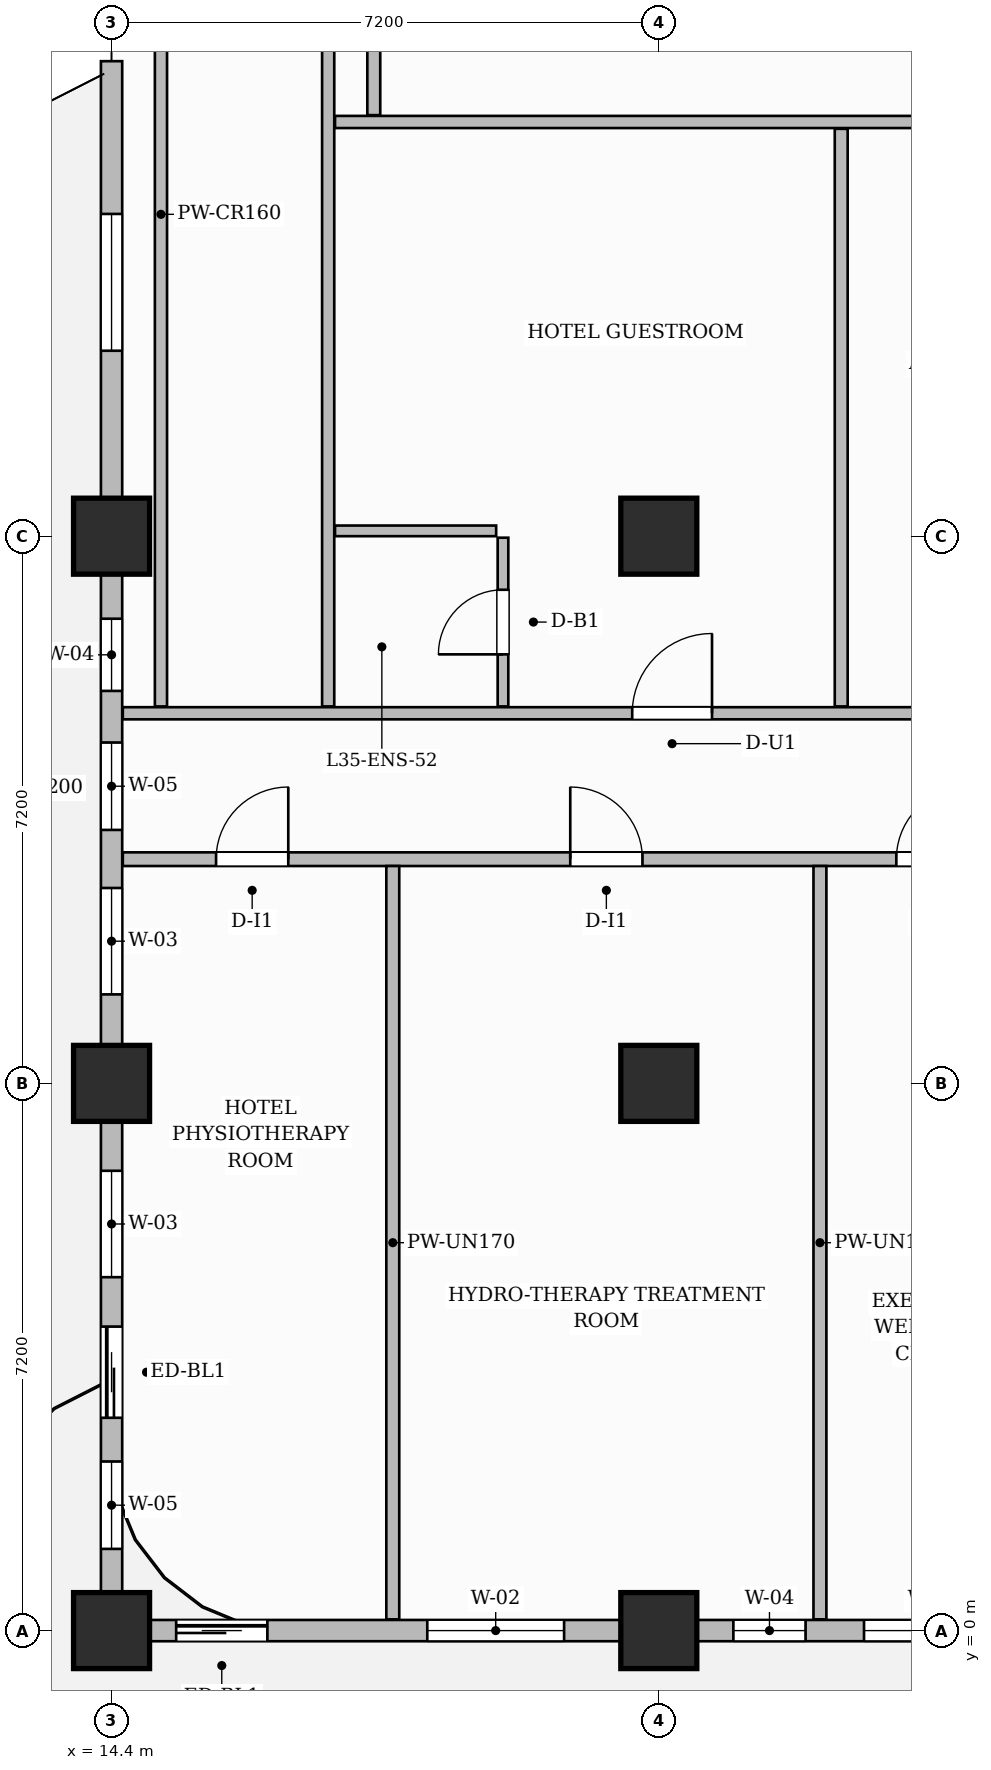
"""IFC4 building model, lengths in metres.
Left out: names, types, materials, properties, quantities, classifications, styles, units other than length and angle.
Written with IfcOpenShell. Run it as: python <this file> out.ifc"""

import sys

from ifc_helpers import new_model, si_unit, direction, frame, frame_2d, origin, origin_2d, place, context, subcontext, project, spatial, rectangle, extrude, source, transform, mapped, element, fill, save


model = new_model("IFC4")
c1 = context("Model", 3, precision=1e-05, world=origin(), true_north=direction((0.0, 1.0)))
c2 = subcontext(c1, "Body", "Model", "MODEL_VIEW")
j1 = project(units=[si_unit("LENGTHUNIT", "METRE"), si_unit("PLANEANGLEUNIT", "RADIAN")], contexts=[c1])
p1 = place(None, origin())
s1 = spatial("IfcSite", under=j1, at=p1, CompositionType="ELEMENT")
p2 = place(p1, origin())
s2 = spatial("IfcBuilding", under=s1, at=p2, CompositionType="ELEMENT")
p3 = place(p2, frame((0.0, 0.0, 141.4)))
s3 = spatial("IfcBuildingStorey", under=s2, at=p3, CompositionType="ELEMENT", Elevation=141.4)
m1 = source(origin(), c2, "Body", "SweptSolid", [
    extrude(rectangle(XDim=1.0, YDim=1.0, at=origin_2d()), origin(), (0.0, 0.0, 1.0), 3.7),
])
for number, where, z_axis, x_axis in (
    (1, (14.4, 0.0, 0.0), (0.0, 0.0, 1.0), (1.0, 0.0, 0.0)),
    (2, (14.4, 7.2, 0.0), (0.0, 0.0, 1.0), (1.0, 0.0, 0.0)),
    (3, (14.4, 14.4, 0.0), (0.0, 0.0, 1.0), (1.0, 0.0, 0.0)),
    (4, (21.6, 0.0, 0.0), (0.0, 0.0, 1.0), (1.0, 0.0, 0.0)),
    (5, (21.6, 7.2, 0.0), (0.0, 0.0, 1.0), (1.0, 0.0, 0.0)),
    (6, (21.6, 14.4, 0.0), (0.0, 0.0, 1.0), (1.0, 0.0, 0.0)),
):
    element("IfcColumn", number, at=place(p3, frame(where, z_axis=z_axis, x_axis=x_axis)), inside=s3, PredefinedType="COLUMN", context=c2, shape_type="MappedRepresentation", body=[
        mapped(m1, transform((0.0, 0.0, 0.0), scale=1.0)),
    ])
p4 = place(p3, frame((14.548, 10.15, 0.0), z_axis=(0.0, 0.0, 1.0), x_axis=(1.0, 0.0, 0.0)))
e7 = element("IfcWall", 7, at=p4, inside=s3, PredefinedType="PARTITIONING", context=c2, shape_type="SweptSolid", body=[
    extrude(rectangle(XDim=15.562, YDim=0.18, at=frame_2d((7.781, 0.0))), origin(), (0.0, 0.0, 1.0), 3.4),
])
p5 = place(p4, frame((1.227, 0.0, 0.0)))
e8 = element("IfcOpeningElement", 8, at=p5, cuts=e7, PredefinedType="OPENING", context=c2, shape_type="SweptSolid", body=[
    extrude(rectangle(XDim=0.95, YDim=2.15, at=frame_2d((0.475, 1.075))), frame((0.0, 0.1, 0.0), z_axis=(0.0, -1.0, 0.0), x_axis=(1.0, 0.0, 0.0)), (0.0, 0.0, 1.0), 0.2),
])
p6 = place(p4, frame((5.887, 0.0, 0.0)))
e9 = element("IfcOpeningElement", 9, at=p6, cuts=e7, PredefinedType="OPENING", context=c2, shape_type="SweptSolid", body=[
    extrude(rectangle(XDim=0.95, YDim=2.15, at=frame_2d((0.475, 1.075))), frame((0.0, 0.1, 0.0), z_axis=(0.0, -1.0, 0.0), x_axis=(1.0, 0.0, 0.0)), (0.0, 0.0, 1.0), 0.2),
])
p7 = place(p4, frame((10.177, 0.0, 0.0)))
e10 = element("IfcOpeningElement", 10, at=p7, cuts=e7, PredefinedType="OPENING", context=c2, shape_type="SweptSolid", body=[
    extrude(rectangle(XDim=0.95, YDim=2.15, at=frame_2d((0.475, 1.075))), frame((0.0, 0.1, 0.0), z_axis=(0.0, -1.0, 0.0), x_axis=(1.0, 0.0, 0.0)), (0.0, 0.0, 1.0), 0.2),
])
p8 = place(p4, frame((13.417, 0.0, 0.0)))
e11 = element("IfcOpeningElement", 11, at=p8, cuts=e7, PredefinedType="OPENING", context=c2, shape_type="SweptSolid", body=[
    extrude(rectangle(XDim=0.95, YDim=2.15, at=frame_2d((0.475, 1.075))), frame((0.0, 0.1, 0.0), z_axis=(0.0, -1.0, 0.0), x_axis=(1.0, 0.0, 0.0)), (0.0, 0.0, 1.0), 0.2),
])
p9 = place(p3, frame((14.548, 12.07, 0.0), z_axis=(0.0, 0.0, 1.0), x_axis=(1.0, 0.0, 0.0)))
e12 = element("IfcWall", 12, at=p9, inside=s3, PredefinedType="PARTITIONING", context=c2, shape_type="SweptSolid", body=[
    extrude(rectangle(XDim=15.562, YDim=0.16, at=frame_2d((7.781, 0.0))), origin(), (0.0, 0.0, 1.0), 3.4),
])
p10 = place(p9, frame((6.702, 0.0, 0.0)))
e13 = element("IfcOpeningElement", 13, at=p10, cuts=e12, PredefinedType="OPENING", context=c2, shape_type="SweptSolid", body=[
    extrude(rectangle(XDim=1.05, YDim=2.25, at=frame_2d((0.525, 1.125))), frame((0.0, 0.09, 0.0), z_axis=(0.0, -1.0, 0.0), x_axis=(1.0, 0.0, 0.0)), (0.0, 0.0, 1.0), 0.18),
])
p11 = place(p9, frame((11.852, 0.0, 0.0)))
e14 = element("IfcOpeningElement", 14, at=p11, cuts=e12, PredefinedType="OPENING", context=c2, shape_type="SweptSolid", body=[
    extrude(rectangle(XDim=1.4, YDim=2.35, at=frame_2d((0.7, 1.175))), frame((0.0, 0.09, 0.0), z_axis=(0.0, -1.0, 0.0), x_axis=(1.0, 0.0, 0.0)), (0.0, 0.0, 1.0), 0.18),
])
p12 = place(p3, frame((18.1, 0.148, 0.0), z_axis=(0.0, 0.0, 1.0), x_axis=(0.0, 1.0, 0.0)))
e15 = element("IfcWall", 15, at=p12, inside=s3, PredefinedType="PARTITIONING", context=c2, shape_type="SweptSolid", body=[
    extrude(rectangle(XDim=9.912, YDim=0.17, at=frame_2d((4.956, 0.0))), origin(), (0.0, 0.0, 1.0), 3.055),
])
p13 = place(p3, frame((23.72, 0.148, 0.0), z_axis=(0.0, 0.0, 1.0), x_axis=(0.0, 1.0, 0.0)))
e16 = element("IfcWall", 16, at=p13, inside=s3, PredefinedType="PARTITIONING", context=c2, shape_type="SweptSolid", body=[
    extrude(rectangle(XDim=9.912, YDim=0.17, at=frame_2d((4.956, 0.0))), origin(), (0.0, 0.0, 1.0), 3.4),
])
for number, where, z_axis, x_axis in (
    (17, (15.05, 12.16, 0.0), (0.0, 0.0, 1.0), (0.0, 1.0, 0.0)),
    (18, (17.25, 12.16, 0.0), (0.0, 0.0, 1.0), (0.0, 1.0, 0.0)),
):
    element("IfcWall", number, at=place(p3, frame(where, z_axis=z_axis, x_axis=x_axis)), inside=s3, PredefinedType="PARTITIONING", context=c2, shape_type="SweptSolid", body=[
        extrude(rectangle(XDim=12.95, YDim=0.16, at=frame_2d((6.475, 0.0))), origin(), (0.0, 0.0, 1.0), 3.4),
    ])
p14 = place(p3, frame((17.85, 19.94, 0.0), z_axis=(0.0, 0.0, 1.0), x_axis=(0.0, 1.0, 0.0)))
e19 = element("IfcWall", 19, at=p14, inside=s3, PredefinedType="PARTITIONING", context=c2, shape_type="SweptSolid", body=[
    extrude(rectangle(XDim=5.22, YDim=0.17, at=frame_2d((2.61, 0.0))), origin(), (0.0, 0.0, 1.0), 3.055),
])
p15 = place(p3, frame((17.34, 19.85, 0.0), z_axis=(0.0, 0.0, 1.0), x_axis=(1.0, 0.0, 0.0)))
e20 = element("IfcWall", 20, at=p15, inside=s3, PredefinedType="PARTITIONING", context=c2, shape_type="SweptSolid", body=[
    extrude(rectangle(XDim=10.92, YDim=0.16, at=frame_2d((5.46, 0.0))), origin(), (0.0, 0.0, 1.0), 3.4),
])
p16 = place(p3, frame((24.0, 12.16, 0.0), z_axis=(0.0, 0.0, 1.0), x_axis=(0.0, 1.0, 0.0)))
e21 = element("IfcWall", 21, at=p16, inside=s3, PredefinedType="PARTITIONING", context=c2, shape_type="SweptSolid", body=[
    extrude(rectangle(XDim=7.6, YDim=0.17, at=frame_2d((3.8, 0.0))), origin(), (0.0, 0.0, 1.0), 3.4),
])
p17 = place(p3, frame((19.55, 12.16, 0.0), z_axis=(0.0, 0.0, 1.0), x_axis=(0.0, 1.0, 0.0)))
e22 = element("IfcWall", 22, at=p17, inside=s3, PredefinedType="PARTITIONING", context=c2, shape_type="SweptSolid", body=[
    extrude(rectangle(XDim=2.22, YDim=0.14, at=frame_2d((1.11, 0.0))), origin(), (0.0, 0.0, 1.0), 3.4),
])
p18 = place(p17, frame((0.685, 0.0, 0.0)))
e23 = element("IfcOpeningElement", 23, at=p18, cuts=e22, PredefinedType="OPENING", context=c2, shape_type="SweptSolid", body=[
    extrude(rectangle(XDim=0.85, YDim=2.1, at=frame_2d((0.425, 1.05))), frame((0.0, 0.08, 0.0), z_axis=(0.0, -1.0, 0.0), x_axis=(1.0, 0.0, 0.0)), (0.0, 0.0, 1.0), 0.16),
])
p19 = place(p3, frame((17.34, 14.47, 0.0), z_axis=(0.0, 0.0, 1.0), x_axis=(1.0, 0.0, 0.0)))
e24 = element("IfcWall", 24, at=p19, inside=s3, PredefinedType="PARTITIONING", context=c2, shape_type="SweptSolid", body=[
    extrude(rectangle(XDim=2.12, YDim=0.14, at=frame_2d((1.06, 0.0))), origin(), (0.0, 0.0, 1.0), 2.885),
])
p20 = place(p3, frame((14.4, 0.0, 0.0), z_axis=(0.0, 0.0, 1.0), x_axis=(1.0, 0.0, 0.0)))
e25 = element("IfcWall", 25, at=p20, inside=s3, PredefinedType="SOLIDWALL", context=c2, shape_type="SweptSolid", body=[
    extrude(rectangle(XDim=35.4, YDim=0.28, at=frame_2d((17.7, 0.0))), origin(), (0.0, 0.0, 1.0), 2.885),
])
p21 = place(p20, frame((0.85, 0.0, 0.0)))
e26 = element("IfcOpeningElement", 26, at=p21, cuts=e25, PredefinedType="OPENING", context=c2, shape_type="SweptSolid", body=[
    extrude(rectangle(XDim=1.2, YDim=2.2, at=frame_2d((0.6, 1.1))), frame((0.0, 0.15, 0.0), z_axis=(0.0, -1.0, 0.0), x_axis=(1.0, 0.0, 0.0)), (0.0, 0.0, 1.0), 0.3),
])
p22 = place(p20, frame((4.154, 0.0, 0.8)))
e27 = element("IfcOpeningElement", 27, at=p22, cuts=e25, PredefinedType="OPENING", context=c2, shape_type="SweptSolid", body=[
    extrude(rectangle(XDim=1.8, YDim=1.85, at=frame_2d((0.9, 0.925))), frame((0.0, 0.15, 0.0), z_axis=(0.0, -1.0, 0.0), x_axis=(1.0, 0.0, 0.0)), (0.0, 0.0, 1.0), 0.3),
])
p23 = place(p20, frame((8.181, 0.0, 0.8)))
e28 = element("IfcOpeningElement", 28, at=p23, cuts=e25, PredefinedType="OPENING", context=c2, shape_type="SweptSolid", body=[
    extrude(rectangle(XDim=0.95, YDim=1.75, at=frame_2d((0.475, 0.875))), frame((0.0, 0.15, 0.0), z_axis=(0.0, -1.0, 0.0), x_axis=(1.0, 0.0, 0.0)), (0.0, 0.0, 1.0), 0.3),
])
p24 = place(p20, frame((9.9, 0.0, 0.8)))
e29 = element("IfcOpeningElement", 29, at=p24, cuts=e25, PredefinedType="OPENING", context=c2, shape_type="SweptSolid", body=[
    extrude(rectangle(XDim=1.8, YDim=1.85, at=frame_2d((0.9, 0.925))), frame((0.0, 0.15, 0.0), z_axis=(0.0, -1.0, 0.0), x_axis=(1.0, 0.0, 0.0)), (0.0, 0.0, 1.0), 0.3),
])
p25 = place(p20, frame((12.469, 0.0, 0.8)))
e30 = element("IfcOpeningElement", 30, at=p25, cuts=e25, PredefinedType="OPENING", context=c2, shape_type="SweptSolid", body=[
    extrude(rectangle(XDim=0.95, YDim=1.75, at=frame_2d((0.475, 0.875))), frame((0.0, 0.15, 0.0), z_axis=(0.0, -1.0, 0.0), x_axis=(1.0, 0.0, 0.0)), (0.0, 0.0, 1.0), 0.3),
])
p26 = place(p20, frame((16.804, 0.0, 0.8)))
e31 = element("IfcOpeningElement", 31, at=p26, cuts=e25, PredefinedType="OPENING", context=c2, shape_type="SweptSolid", body=[
    extrude(rectangle(XDim=1.8, YDim=1.85, at=frame_2d((0.9, 0.925))), frame((0.0, 0.15, 0.0), z_axis=(0.0, -1.0, 0.0), x_axis=(1.0, 0.0, 0.0)), (0.0, 0.0, 1.0), 0.3),
])
p27 = place(p20, frame((21.521, 0.0, 0.8)))
e32 = element("IfcOpeningElement", 32, at=p27, cuts=e25, PredefinedType="OPENING", context=c2, shape_type="SweptSolid", body=[
    extrude(rectangle(XDim=0.95, YDim=1.75, at=frame_2d((0.475, 0.875))), frame((0.0, 0.15, 0.0), z_axis=(0.0, -1.0, 0.0), x_axis=(1.0, 0.0, 0.0)), (0.0, 0.0, 1.0), 0.3),
])
p28 = place(p20, frame((23.904, 0.0, 0.8)))
e33 = element("IfcOpeningElement", 33, at=p28, cuts=e25, PredefinedType="OPENING", context=c2, shape_type="SweptSolid", body=[
    extrude(rectangle(XDim=1.8, YDim=1.85, at=frame_2d((0.9, 0.925))), frame((0.0, 0.15, 0.0), z_axis=(0.0, -1.0, 0.0), x_axis=(1.0, 0.0, 0.0)), (0.0, 0.0, 1.0), 0.3),
])
p29 = place(p20, frame((29.681, 0.0, 0.8)))
e34 = element("IfcOpeningElement", 34, at=p29, cuts=e25, PredefinedType="OPENING", context=c2, shape_type="SweptSolid", body=[
    extrude(rectangle(XDim=1.8, YDim=1.85, at=frame_2d((0.9, 0.925))), frame((0.0, 0.15, 0.0), z_axis=(0.0, -1.0, 0.0), x_axis=(1.0, 0.0, 0.0)), (0.0, 0.0, 1.0), 0.3),
])
p30 = place(p20, frame((32.327, 0.0, 0.8)))
e35 = element("IfcOpeningElement", 35, at=p30, cuts=e25, PredefinedType="OPENING", context=c2, shape_type="SweptSolid", body=[
    extrude(rectangle(XDim=1.8, YDim=1.85, at=frame_2d((0.9, 0.925))), frame((0.0, 0.15, 0.0), z_axis=(0.0, -1.0, 0.0), x_axis=(1.0, 0.0, 0.0)), (0.0, 0.0, 1.0), 0.3),
])
p31 = place(p3, frame((14.4, 0.05, 0.0), z_axis=(0.0, 0.0, 1.0), x_axis=(0.0, 1.0, 0.0)))
e36 = element("IfcWall", 36, at=p31, inside=s3, PredefinedType="SOLIDWALL", context=c2, shape_type="SweptSolid", body=[
    extrude(rectangle(XDim=20.6, YDim=0.28, at=frame_2d((10.3, 0.0))), origin(), (0.0, 0.0, 1.0), 2.885),
])
p32 = place(p31, frame((2.75, 0.0, 0.0)))
e37 = element("IfcOpeningElement", 37, at=p32, cuts=e36, PredefinedType="OPENING", context=c2, shape_type="SweptSolid", body=[
    extrude(rectangle(XDim=1.2, YDim=2.2, at=frame_2d((0.6, 1.1))), frame((0.0, 0.15, 0.0), z_axis=(0.0, -1.0, 0.0), x_axis=(1.0, 0.0, 0.0)), (0.0, 0.0, 1.0), 0.3),
])
p33 = place(p31, frame((1.025, 0.0, 0.8)))
e38 = element("IfcOpeningElement", 38, at=p33, cuts=e36, PredefinedType="OPENING", context=c2, shape_type="SweptSolid", body=[
    extrude(rectangle(XDim=1.15, YDim=1.8, at=frame_2d((0.575, 0.9))), frame((0.0, 0.15, 0.0), z_axis=(0.0, -1.0, 0.0), x_axis=(1.0, 0.0, 0.0)), (0.0, 0.0, 1.0), 0.3),
])
p34 = place(p31, frame((4.6, 0.0, 0.8)))
e39 = element("IfcOpeningElement", 39, at=p34, cuts=e36, PredefinedType="OPENING", context=c2, shape_type="SweptSolid", body=[
    extrude(rectangle(XDim=1.4, YDim=1.85, at=frame_2d((0.7, 0.925))), frame((0.0, 0.15, 0.0), z_axis=(0.0, -1.0, 0.0), x_axis=(1.0, 0.0, 0.0)), (0.0, 0.0, 1.0), 0.3),
])
p35 = place(p31, frame((8.321, 0.0, 0.8)))
e40 = element("IfcOpeningElement", 40, at=p35, cuts=e36, PredefinedType="OPENING", context=c2, shape_type="SweptSolid", body=[
    extrude(rectangle(XDim=1.4, YDim=1.85, at=frame_2d((0.7, 0.925))), frame((0.0, 0.15, 0.0), z_axis=(0.0, -1.0, 0.0), x_axis=(1.0, 0.0, 0.0)), (0.0, 0.0, 1.0), 0.3),
])
p36 = place(p31, frame((10.485, 0.0, 0.8)))
e41 = element("IfcOpeningElement", 41, at=p36, cuts=e36, PredefinedType="OPENING", context=c2, shape_type="SweptSolid", body=[
    extrude(rectangle(XDim=1.15, YDim=1.8, at=frame_2d((0.575, 0.9))), frame((0.0, 0.15, 0.0), z_axis=(0.0, -1.0, 0.0), x_axis=(1.0, 0.0, 0.0)), (0.0, 0.0, 1.0), 0.3),
])
p37 = place(p31, frame((12.314, 0.0, 0.8)))
e42 = element("IfcOpeningElement", 42, at=p37, cuts=e36, PredefinedType="OPENING", context=c2, shape_type="SweptSolid", body=[
    extrude(rectangle(XDim=0.95, YDim=1.75, at=frame_2d((0.475, 0.875))), frame((0.0, 0.15, 0.0), z_axis=(0.0, -1.0, 0.0), x_axis=(1.0, 0.0, 0.0)), (0.0, 0.0, 1.0), 0.3),
])
p38 = place(p31, frame((16.79, 0.0, 0.8)))
e43 = element("IfcOpeningElement", 43, at=p38, cuts=e36, PredefinedType="OPENING", context=c2, shape_type="SweptSolid", body=[
    extrude(rectangle(XDim=1.8, YDim=1.85, at=frame_2d((0.9, 0.925))), frame((0.0, 0.15, 0.0), z_axis=(0.0, -1.0, 0.0), x_axis=(1.0, 0.0, 0.0)), (0.0, 0.0, 1.0), 0.3),
])
m2 = source(origin(), c2, "Body", "SweptSolid", [
    extrude(rectangle(XDim=0.95, YDim=2.15, at=frame_2d((0.475, 1.075))), frame((0.0, 0.025, 0.0), z_axis=(0.0, -1.0, 0.0), x_axis=(1.0, 0.0, 0.0)), (0.0, 0.0, 1.0), 0.05),
])
p39 = place(p5, origin())
e44 = element("IfcDoor", 44, at=p39, inside=s3, OperationType="SINGLE_SWING_RIGHT", PredefinedType="DOOR", context=c2, shape_type="MappedRepresentation", body=[
    mapped(m2, transform((0.0, 0.0, 0.0), scale=1.0)),
])
fill(e8, e44)
p40 = place(p6, origin())
e45 = element("IfcDoor", 45, at=p40, inside=s3, OperationType="SINGLE_SWING_LEFT", PredefinedType="DOOR", context=c2, shape_type="MappedRepresentation", body=[
    mapped(m2, transform((0.0, 0.0, 0.0), scale=1.0)),
])
fill(e9, e45)
p41 = place(p7, origin())
e46 = element("IfcDoor", 46, at=p41, inside=s3, OperationType="SINGLE_SWING_RIGHT", PredefinedType="DOOR", context=c2, shape_type="MappedRepresentation", body=[
    mapped(m2, transform((0.0, 0.0, 0.0), scale=1.0)),
])
fill(e10, e46)
m3 = source(origin(), c2, "Body", "SweptSolid", [
    extrude(rectangle(XDim=0.85, YDim=2.1, at=frame_2d((0.425, 1.05))), frame((0.0, 0.025, 0.0), z_axis=(0.0, -1.0, 0.0), x_axis=(1.0, 0.0, 0.0)), (0.0, 0.0, 1.0), 0.05),
])
p42 = place(p18, origin())
e47 = element("IfcDoor", 47, at=p42, inside=s3, OperationType="SINGLE_SWING_LEFT", PredefinedType="DOOR", context=c2, shape_type="MappedRepresentation", body=[
    mapped(m3, transform((0.0, 0.0, 0.0), scale=1.0)),
])
fill(e23, e47)
m4 = source(origin(), c2, "Body", "SweptSolid", [
    extrude(rectangle(XDim=1.05, YDim=2.25, at=frame_2d((0.525, 1.125))), frame((0.0, 0.025, 0.0), z_axis=(0.0, -1.0, 0.0), x_axis=(1.0, 0.0, 0.0)), (0.0, 0.0, 1.0), 0.05),
])
p43 = place(p10, origin())
e48 = element("IfcDoor", 48, at=p43, inside=s3, OperationType="SINGLE_SWING_RIGHT", PredefinedType="DOOR", context=c2, shape_type="MappedRepresentation", body=[
    mapped(m4, transform((0.0, 0.0, 0.0), scale=1.0)),
])
fill(e13, e48)
m5 = source(origin(), c2, "Body", "SweptSolid", [
    extrude(rectangle(XDim=1.2, YDim=2.2, at=frame_2d((0.6, 1.1))), frame((0.0, 0.025, 0.0), z_axis=(0.0, -1.0, 0.0), x_axis=(1.0, 0.0, 0.0)), (0.0, 0.0, 1.0), 0.05),
])
p44 = place(p21, origin())
e49 = element("IfcDoor", 49, at=p44, inside=s3, OperationType="SLIDING_TO_LEFT", PredefinedType="DOOR", context=c2, shape_type="MappedRepresentation", body=[
    mapped(m5, transform((0.0, 0.0, 0.0), scale=1.0)),
])
fill(e26, e49)
p45 = place(p32, origin())
e50 = element("IfcDoor", 50, at=p45, inside=s3, OperationType="SLIDING_TO_LEFT", PredefinedType="DOOR", context=c2, shape_type="MappedRepresentation", body=[
    mapped(m5, transform((0.0, 0.0, 0.0), scale=1.0)),
])
fill(e37, e50)
m6 = source(origin(), c2, "Body", "SweptSolid", [
    extrude(rectangle(XDim=1.8, YDim=1.85, at=frame_2d((0.9, 0.925))), frame((0.0, 0.03, 0.0), z_axis=(0.0, -1.0, 0.0), x_axis=(1.0, 0.0, 0.0)), (0.0, 0.0, 1.0), 0.06),
])
p46 = place(p22, origin())
e51 = element("IfcWindow", 51, at=p46, inside=s3, PartitioningType="DOUBLE_PANEL_VERTICAL", PredefinedType="WINDOW", context=c2, shape_type="MappedRepresentation", body=[
    mapped(m6, transform((0.0, 0.0, 0.0), scale=1.0)),
])
fill(e27, e51)
m7 = source(origin(), c2, "Body", "SweptSolid", [
    extrude(rectangle(XDim=0.95, YDim=1.75, at=frame_2d((0.475, 0.875))), frame((0.0, 0.03, 0.0), z_axis=(0.0, -1.0, 0.0), x_axis=(1.0, 0.0, 0.0)), (0.0, 0.0, 1.0), 0.06),
])
p47 = place(p23, origin())
e52 = element("IfcWindow", 52, at=p47, inside=s3, PartitioningType="SINGLE_PANEL", PredefinedType="WINDOW", context=c2, shape_type="MappedRepresentation", body=[
    mapped(m7, transform((0.0, 0.0, 0.0), scale=1.0)),
])
fill(e28, e52)
p48 = place(p24, origin())
e53 = element("IfcWindow", 53, at=p48, inside=s3, PartitioningType="DOUBLE_PANEL_VERTICAL", PredefinedType="WINDOW", context=c2, shape_type="MappedRepresentation", body=[
    mapped(m6, transform((0.0, 0.0, 0.0), scale=1.0)),
])
fill(e29, e53)
m8 = source(origin(), c2, "Body", "SweptSolid", [
    extrude(rectangle(XDim=1.15, YDim=1.8, at=frame_2d((0.575, 0.9))), frame((0.0, 0.03, 0.0), z_axis=(0.0, -1.0, 0.0), x_axis=(1.0, 0.0, 0.0)), (0.0, 0.0, 1.0), 0.06),
])
p49 = place(p33, origin())
e54 = element("IfcWindow", 54, at=p49, inside=s3, PartitioningType="SINGLE_PANEL", PredefinedType="WINDOW", context=c2, shape_type="MappedRepresentation", body=[
    mapped(m8, transform((0.0, 0.0, 0.0), scale=1.0)),
])
fill(e38, e54)
m9 = source(origin(), c2, "Body", "SweptSolid", [
    extrude(rectangle(XDim=1.4, YDim=1.85, at=frame_2d((0.7, 0.925))), frame((0.0, 0.03, 0.0), z_axis=(0.0, -1.0, 0.0), x_axis=(1.0, 0.0, 0.0)), (0.0, 0.0, 1.0), 0.06),
])
p50 = place(p34, origin())
e55 = element("IfcWindow", 55, at=p50, inside=s3, PartitioningType="SINGLE_PANEL", PredefinedType="WINDOW", context=c2, shape_type="MappedRepresentation", body=[
    mapped(m9, transform((0.0, 0.0, 0.0), scale=1.0)),
])
fill(e39, e55)
p51 = place(p35, origin())
e56 = element("IfcWindow", 56, at=p51, inside=s3, PartitioningType="SINGLE_PANEL", PredefinedType="WINDOW", context=c2, shape_type="MappedRepresentation", body=[
    mapped(m9, transform((0.0, 0.0, 0.0), scale=1.0)),
])
fill(e40, e56)
p52 = place(p36, origin())
e57 = element("IfcWindow", 57, at=p52, inside=s3, PartitioningType="SINGLE_PANEL", PredefinedType="WINDOW", context=c2, shape_type="MappedRepresentation", body=[
    mapped(m8, transform((0.0, 0.0, 0.0), scale=1.0)),
])
fill(e41, e57)
p53 = place(p37, origin())
e58 = element("IfcWindow", 58, at=p53, inside=s3, PartitioningType="SINGLE_PANEL", PredefinedType="WINDOW", context=c2, shape_type="MappedRepresentation", body=[
    mapped(m7, transform((0.0, 0.0, 0.0), scale=1.0)),
])
fill(e42, e58)
p54 = place(p38, origin())
e59 = element("IfcWindow", 59, at=p54, inside=s3, PartitioningType="DOUBLE_PANEL_VERTICAL", PredefinedType="WINDOW", context=c2, shape_type="MappedRepresentation", body=[
    mapped(m6, transform((0.0, 0.0, 0.0), scale=1.0)),
])
fill(e43, e59)
save(model, sys.argv[1])
